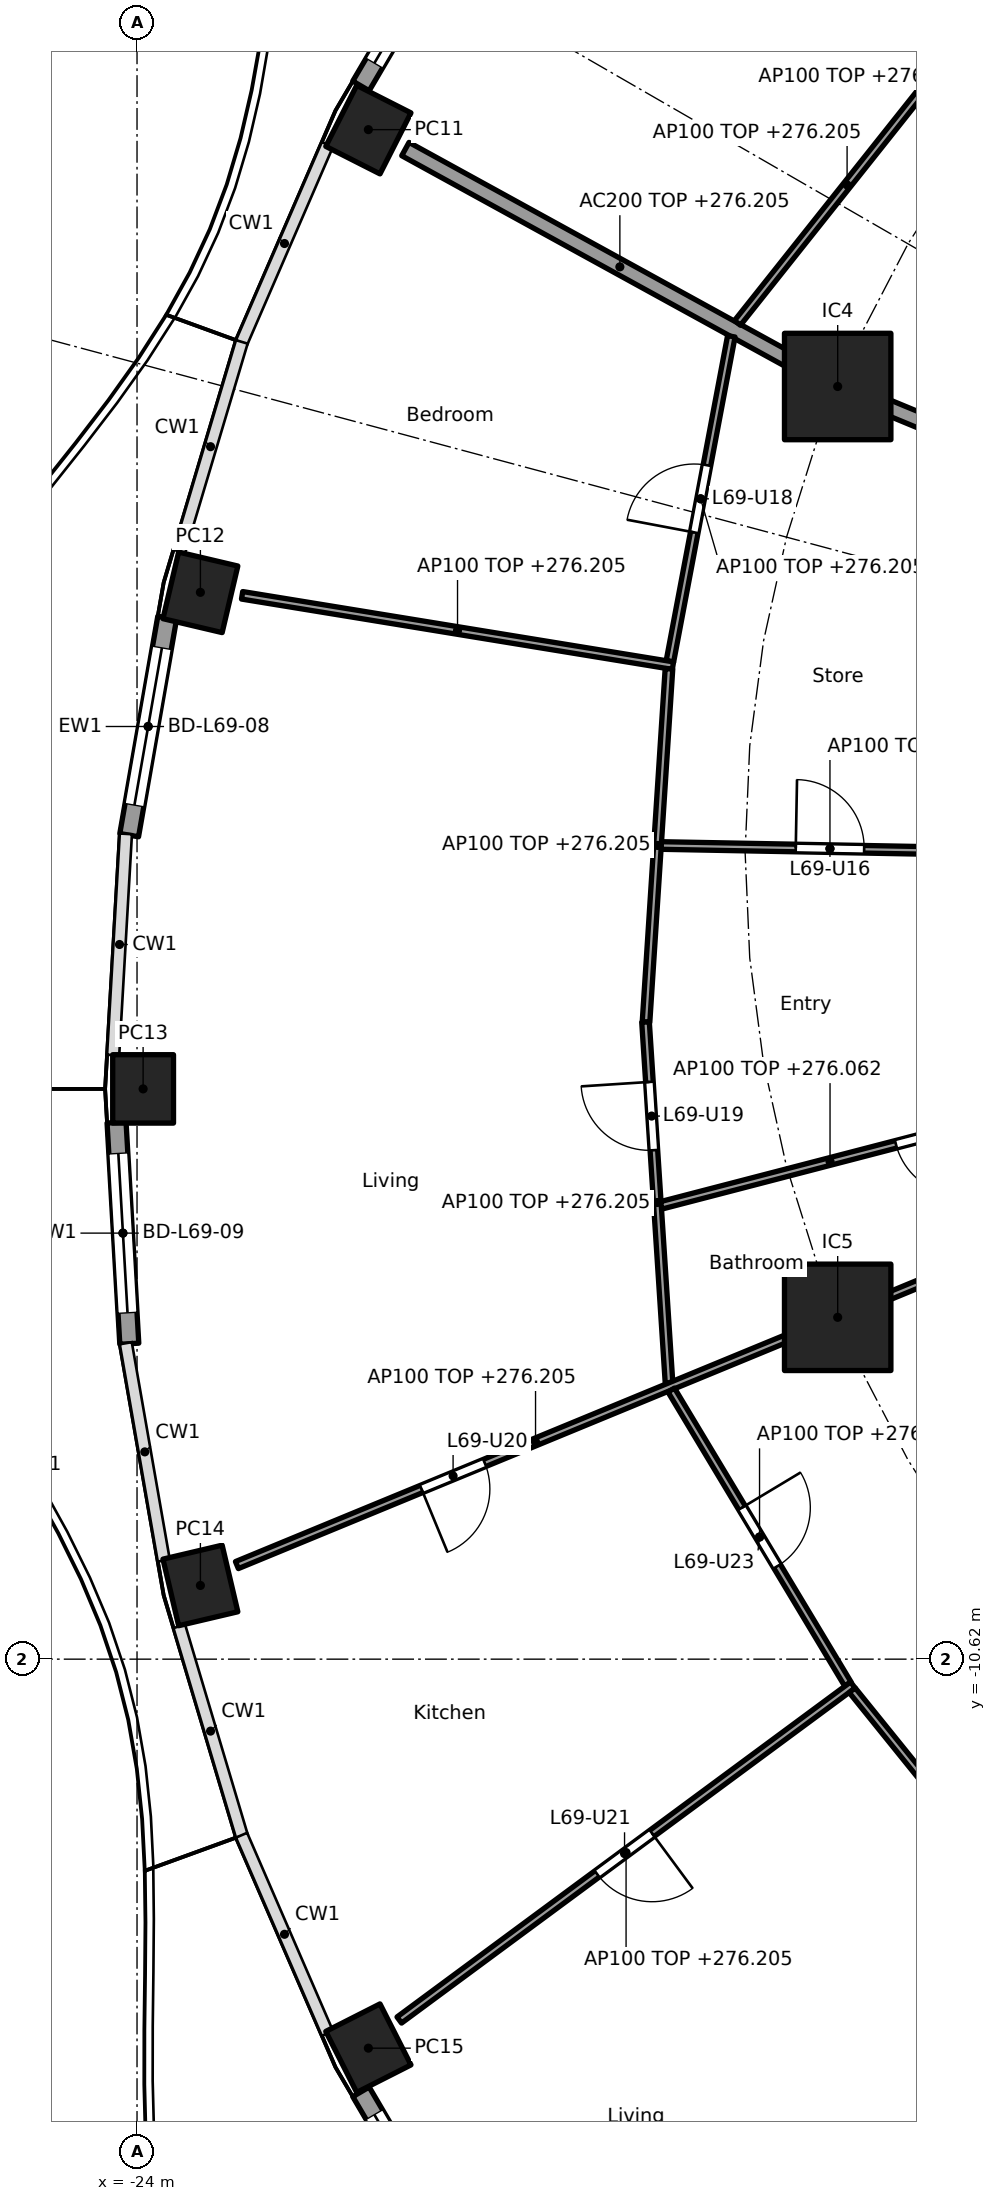
"""IFC4 building model, lengths in metres.
Left out: names, types, materials, properties, quantities, classifications, styles, units other than length and angle.
Written with IfcOpenShell. Run it as: python <this file> out.ifc"""

import sys

from ifc_helpers import new_model, si_unit, direction, frame, frame_2d, origin, origin_2d, place, context, subcontext, project, spatial, rectangle, hollow_rectangle, extrude, element, fill, save


model = new_model("IFC4")
c1 = context("Model", 3, precision=1e-05, world=origin(), true_north=direction((0.0, 1.0)))
c2 = subcontext(c1, "Body", "Model", "MODEL_VIEW")
j1 = project(units=[si_unit("LENGTHUNIT", "METRE"), si_unit("PLANEANGLEUNIT", "RADIAN")], contexts=[c1])
p1 = place(None, origin())
s1 = spatial("IfcSite", under=j1, at=p1, CompositionType="ELEMENT")
p2 = place(p1, origin())
s2 = spatial("IfcBuilding", under=s1, at=p2, CompositionType="ELEMENT")
p3 = place(p2, frame((0.0, 0.0, 273.3)))
s3 = spatial("IfcBuildingStorey", under=s2, at=p3, CompositionType="ELEMENT", Elevation=273.3)
for number, where, z_axis, x_axis in (
    (1, (-20.957, 9.502, 0.0), (0.0, 0.0, 1.0), (-0.452, -0.892, 0.0)),
    (2, (-23.166, 3.415, 0.0), (0.0, 0.0, 1.0), (-0.229, -0.973, 0.0)),
    (3, (-23.92, -3.118, 0.0), (0.0, 0.0, 1.0), (0.0, -1.0, 0.0)),
    (4, (-23.166, -9.65, 0.0), (0.0, 0.0, 1.0), (0.229, -0.973, 0.0)),
    (5, (-20.957, -15.738, 0.0), (0.0, 0.0, 1.0), (0.452, -0.892, 0.0)),
):
    element("IfcColumn", number, at=place(p3, frame(where, z_axis=z_axis, x_axis=x_axis)), inside=s3, PredefinedType="COLUMN", context=c2, shape_type="SweptSolid", body=[
        extrude(hollow_rectangle(XDim=0.9, YDim=0.8, WallThickness=0.028, at=origin_2d()), origin(), (0.0, 0.0, 1.0), 3.7),
    ])
for number, where, z_axis, x_axis in (
    (6, (-14.782, 6.123, 0.0), (0.0, 0.0, 1.0), (1.0, 0.0, 0.0)),
    (7, (-14.782, -6.123, 0.0), (0.0, 0.0, 1.0), (1.0, 0.0, 0.0)),
):
    element("IfcColumn", number, at=place(p3, frame(where, z_axis=z_axis, x_axis=x_axis)), inside=s3, PredefinedType="COLUMN", context=c2, shape_type="SweptSolid", body=[
        extrude(rectangle(XDim=1.4, YDim=1.4, at=origin_2d()), origin(), (0.0, 0.0, 1.0), 3.7),
    ])
p4 = place(p3, frame((-21.054, 10.077, 0.0), z_axis=(0.0, 0.0, 1.0), x_axis=(0.506371364425, 0.862315511452, 0.0)))
e8 = element("IfcWall", 8, at=p4, inside=s3, PredefinedType="SOLIDWALL", context=c2, shape_type="SweptSolid", body=[
    extrude(rectangle(XDim=2.796, YDim=0.25, at=frame_2d((1.398, 0.0))), origin(), (0.0, 0.0, 1.0), 3.44),
])
p5 = place(p4, frame((0.348, 0.0, 0.0)))
e9 = element("IfcOpeningElement", 9, at=p5, cuts=e8, PredefinedType="OPENING", context=c2, shape_type="SweptSolid", body=[
    extrude(rectangle(XDim=2.1, YDim=2.4, at=frame_2d((1.05, 1.2))), frame((0.0, 0.135, 0.0), z_axis=(0.0, -1.0, 0.0), x_axis=(1.0, 0.0, 0.0)), (0.0, 0.0, 1.0), 0.27),
])
p6 = place(p3, frame((-24.103, 0.22, 0.0), z_axis=(0.0, 0.0, 1.0), x_axis=(0.172182411767, 0.985065082661, 0.0)))
e10 = element("IfcWall", 10, at=p6, inside=s3, PredefinedType="SOLIDWALL", context=c2, shape_type="SweptSolid", body=[
    extrude(rectangle(XDim=2.903, YDim=0.25, at=frame_2d((1.451, 0.0))), origin(), (0.0, 0.0, 1.0), 3.44),
])
p7 = place(p6, frame((0.401, 0.0, 0.0)))
e11 = element("IfcOpeningElement", 11, at=p7, cuts=e10, PredefinedType="OPENING", context=c2, shape_type="SweptSolid", body=[
    extrude(rectangle(XDim=2.1, YDim=2.4, at=frame_2d((1.05, 1.2))), frame((0.0, 0.135, 0.0), z_axis=(0.0, -1.0, 0.0), x_axis=(1.0, 0.0, 0.0)), (0.0, 0.0, 1.0), 0.27),
])
p8 = place(p3, frame((-24.102, -6.47, 0.0), z_axis=(0.0, 0.0, 1.0), x_axis=(-0.057450463359, 0.99834835817, 0.0)))
e12 = element("IfcWall", 12, at=p8, inside=s3, PredefinedType="SOLIDWALL", context=c2, shape_type="SweptSolid", body=[
    extrude(rectangle(XDim=2.915, YDim=0.25, at=frame_2d((1.458, 0.0))), origin(), (0.0, 0.0, 1.0), 3.44),
])
p9 = place(p8, frame((0.408, 0.0, 0.0)))
e13 = element("IfcOpeningElement", 13, at=p9, cuts=e12, PredefinedType="OPENING", context=c2, shape_type="SweptSolid", body=[
    extrude(rectangle(XDim=2.1, YDim=2.4, at=frame_2d((1.05, 1.2))), frame((0.0, 0.135, 0.0), z_axis=(0.0, -1.0, 0.0), x_axis=(1.0, 0.0, 0.0)), (0.0, 0.0, 1.0), 0.27),
])
p10 = place(p3, frame((-19.638, -18.724, 0.0), z_axis=(0.0, 0.0, 1.0), x_axis=(-0.506371364425, 0.862315511452, 0.0)))
e14 = element("IfcWall", 14, at=p10, inside=s3, PredefinedType="SOLIDWALL", context=c2, shape_type="SweptSolid", body=[
    extrude(rectangle(XDim=2.796, YDim=0.25, at=frame_2d((1.398, 0.0))), origin(), (0.0, 0.0, 1.0), 3.44),
])
p11 = place(p10, frame((0.348, 0.0, 0.0)))
e15 = element("IfcOpeningElement", 15, at=p11, cuts=e14, PredefinedType="OPENING", context=c2, shape_type="SweptSolid", body=[
    extrude(rectangle(XDim=2.1, YDim=2.4, at=frame_2d((1.05, 1.2))), frame((0.0, 0.135, 0.0), z_axis=(0.0, -1.0, 0.0), x_axis=(1.0, 0.0, 0.0)), (0.0, 0.0, 1.0), 0.27),
])
p12 = place(p3, frame((-12.657, 5.243, 0.0), z_axis=(0.0, 0.0, 1.0), x_axis=(-0.923869415315, 0.382707856524, 0.0)))
e16 = element("IfcWall", 16, at=p12, inside=s3, PredefinedType="PARTITIONING", context=c2, shape_type="SweptSolid", body=[
    extrude(rectangle(XDim=2.2, YDim=0.2, at=frame_2d((1.1, 0.0))), origin(), (0.0, 0.0, 1.0), 3.44),
])
p13 = place(p3, frame((-14.826, 6.147, 0.0), z_axis=(0.0, 0.0, 1.0), x_axis=(-0.876484755865, 0.481429613481, 0.0)))
e17 = element("IfcWall", 17, at=p13, inside=s3, PredefinedType="PARTITIONING", context=c2, shape_type="SweptSolid", body=[
    extrude(rectangle(XDim=6.439, YDim=0.2, at=frame_2d((3.219, 0.0))), origin(), (0.0, 0.0, 1.0), 2.905),
])
p14 = place(p3, frame((-10.183, 7.727, 0.0), z_axis=(0.0, 0.0, 1.0), x_axis=(-0.719063433856, 0.694944442449, 0.0)))
e18 = element("IfcWall", 18, at=p14, inside=s3, PredefinedType="PARTITIONING", context=c2, shape_type="SweptSolid", body=[
    extrude(rectangle(XDim=9.535, YDim=0.1, at=frame_2d((4.768, 0.0))), origin(), (0.0, 0.0, 1.0), 2.762),
])
p15 = place(p14, frame((1.637, 0.0, 0.0)))
e19 = element("IfcOpeningElement", 19, at=p15, cuts=e18, PredefinedType="OPENING", context=c2, shape_type="SweptSolid", body=[
    extrude(rectangle(XDim=0.9, YDim=2.1, at=frame_2d((0.45, 1.05))), frame((0.0, 0.06, 0.0), z_axis=(0.0, -1.0, 0.0), x_axis=(1.0, 0.0, 0.0)), (0.0, 0.0, 1.0), 0.12),
])
p16 = place(p14, frame((6.405, 0.0, 0.0)))
e20 = element("IfcOpeningElement", 20, at=p16, cuts=e18, PredefinedType="OPENING", context=c2, shape_type="SweptSolid", body=[
    extrude(rectangle(XDim=0.9, YDim=2.1, at=frame_2d((0.45, 1.05))), frame((0.0, 0.06, 0.0), z_axis=(0.0, -1.0, 0.0), x_axis=(1.0, 0.0, 0.0)), (0.0, 0.0, 1.0), 0.12),
])
p17 = place(p3, frame((-13.216, 10.589, 0.0), z_axis=(0.0, 0.0, 1.0), x_axis=(-0.622251572882, -0.782817335045, 0.0)))
e21 = element("IfcWall", 21, at=p17, inside=s3, PredefinedType="PARTITIONING", context=c2, shape_type="SweptSolid", body=[
    extrude(rectangle(XDim=4.636, YDim=0.1, at=frame_2d((2.318, 0.0))), origin(), (0.0, 0.0, 1.0), 2.905),
])
p18 = place(p3, frame((-16.181, 6.783, 0.0), z_axis=(0.0, 0.0, 1.0), x_axis=(-0.185670583745, -0.982612046706, 0.0)))
e22 = element("IfcWall", 22, at=p18, inside=s3, PredefinedType="PARTITIONING", context=c2, shape_type="SweptSolid", body=[
    extrude(rectangle(XDim=4.351, YDim=0.1, at=frame_2d((2.176, 0.0))), origin(), (0.0, 0.0, 1.0), 2.905),
])
p19 = place(p18, frame((1.726, 0.0, 0.0)))
e23 = element("IfcOpeningElement", 23, at=p19, cuts=e22, PredefinedType="OPENING", context=c2, shape_type="SweptSolid", body=[
    extrude(rectangle(XDim=0.9, YDim=2.1, at=frame_2d((0.45, 1.05))), frame((0.0, 0.06, 0.0), z_axis=(0.0, -1.0, 0.0), x_axis=(1.0, 0.0, 0.0)), (0.0, 0.0, 1.0), 0.12),
])
p20 = place(p3, frame((-16.949, 2.451, 0.0), z_axis=(0.0, 0.0, 1.0), x_axis=(-0.986937570833, 0.161103169673, 0.0)))
e24 = element("IfcWall", 24, at=p20, inside=s3, PredefinedType="PARTITIONING", context=c2, shape_type="SweptSolid", body=[
    extrude(rectangle(XDim=5.743, YDim=0.1, at=frame_2d((2.872, 0.0))), origin(), (0.0, 0.0, 1.0), 2.905),
])
p21 = place(p3, frame((-17.002, 2.409, 0.0), z_axis=(0.0, 0.0, 1.0), x_axis=(-0.064855550758, -0.997894662545, 0.0)))
e25 = element("IfcWall", 25, at=p21, inside=s3, PredefinedType="PARTITIONING", context=c2, shape_type="SweptSolid", body=[
    extrude(rectangle(XDim=4.656, YDim=0.1, at=frame_2d((2.328, 0.0))), origin(), (0.0, 0.0, 1.0), 2.905),
])
p22 = place(p3, frame((-12.665, 0.002, 0.0), z_axis=(0.0, 0.0, 1.0), x_axis=(-0.999827178165, 0.018590691287, 0.0)))
e26 = element("IfcWall", 26, at=p22, inside=s3, PredefinedType="PARTITIONING", context=c2, shape_type="SweptSolid", body=[
    extrude(rectangle(XDim=4.439, YDim=0.1, at=frame_2d((2.219, 0.0))), origin(), (0.0, 0.0, 1.0), 2.762),
])
p23 = place(p22, frame((1.769, 0.0, 0.0)))
e27 = element("IfcOpeningElement", 27, at=p23, cuts=e26, PredefinedType="OPENING", context=c2, shape_type="SweptSolid", body=[
    extrude(rectangle(XDim=0.9, YDim=2.1, at=frame_2d((0.45, 1.05))), frame((0.0, 0.06, 0.0), z_axis=(0.0, -1.0, 0.0), x_axis=(1.0, 0.0, 0.0)), (0.0, 0.0, 1.0), 0.12),
])
p24 = place(p3, frame((-17.31, -2.238, 0.0), z_axis=(0.0, 0.0, 1.0), x_axis=(0.064949202176, -0.997888571503, 0.0)))
e28 = element("IfcWall", 28, at=p24, inside=s3, PredefinedType="PARTITIONING", context=c2, shape_type="SweptSolid", body=[
    extrude(rectangle(XDim=4.759, YDim=0.1, at=frame_2d((2.379, 0.0))), origin(), (0.0, 0.0, 1.0), 2.905),
])
p25 = place(p24, frame((0.79, 0.0, 0.0)))
e29 = element("IfcOpeningElement", 29, at=p25, cuts=e28, PredefinedType="OPENING", context=c2, shape_type="SweptSolid", body=[
    extrude(rectangle(XDim=0.9, YDim=2.1, at=frame_2d((0.45, 1.05))), frame((0.0, 0.06, 0.0), z_axis=(0.0, -1.0, 0.0), x_axis=(1.0, 0.0, 0.0)), (0.0, 0.0, 1.0), 0.12),
])
p26 = place(p3, frame((-12.662, -3.495, 0.0), z_axis=(0.0, 0.0, 1.0), x_axis=(-0.967834941053, -0.251586022817, 0.0)))
e30 = element("IfcWall", 30, at=p26, inside=s3, PredefinedType="PARTITIONING", context=c2, shape_type="SweptSolid", body=[
    extrude(rectangle(XDim=4.59, YDim=0.1, at=frame_2d((2.295, 0.0))), origin(), (0.0, 0.0, 1.0), 2.762),
])
p27 = place(p26, frame((0.5, 0.0, 0.0)))
e31 = element("IfcOpeningElement", 31, at=p27, cuts=e30, PredefinedType="OPENING", context=c2, shape_type="SweptSolid", body=[
    extrude(rectangle(XDim=0.9, YDim=2.1, at=frame_2d((0.45, 1.05))), frame((0.0, 0.06, 0.0), z_axis=(0.0, -1.0, 0.0), x_axis=(1.0, 0.0, 0.0)), (0.0, 0.0, 1.0), 0.12),
])
p28 = place(p3, frame((-12.657, -5.243, 0.0), z_axis=(0.0, 0.0, 1.0), x_axis=(-0.923871314276, -0.382703272338, 0.0)))
e32 = element("IfcWall", 32, at=p28, inside=s3, PredefinedType="PARTITIONING", context=c2, shape_type="SweptSolid", body=[
    extrude(rectangle(XDim=2.249, YDim=0.1, at=frame_2d((1.125, 0.0))), origin(), (0.0, 0.0, 1.0), 3.44),
])
p29 = place(p3, frame((-14.828, -6.142, 0.0), z_axis=(0.0, 0.0, 1.0), x_axis=(-0.924478087429, -0.381235184451, 0.0)))
e33 = element("IfcWall", 33, at=p29, inside=s3, PredefinedType="PARTITIONING", context=c2, shape_type="SweptSolid", body=[
    extrude(rectangle(XDim=8.499, YDim=0.1, at=frame_2d((4.25, 0.0))), origin(), (0.0, 0.0, 1.0), 2.905),
])
p30 = place(p29, frame((4.973, 0.0, 0.0)))
e34 = element("IfcOpeningElement", 34, at=p30, cuts=e33, PredefinedType="OPENING", context=c2, shape_type="SweptSolid", body=[
    extrude(rectangle(XDim=0.9, YDim=2.1, at=frame_2d((0.45, 1.05))), frame((0.0, 0.06, 0.0), z_axis=(0.0, -1.0, 0.0), x_axis=(1.0, 0.0, 0.0)), (0.0, 0.0, 1.0), 0.12),
])
p31 = place(p3, frame((-16.972, -7.08, 0.0), z_axis=(0.0, 0.0, 1.0), x_axis=(0.514989049311, -0.857196756346, 0.0)))
e35 = element("IfcWall", 35, at=p31, inside=s3, PredefinedType="PARTITIONING", context=c2, shape_type="SweptSolid", body=[
    extrude(rectangle(XDim=4.512, YDim=0.1, at=frame_2d((2.256, 0.0))), origin(), (0.0, 0.0, 1.0), 2.905),
])
p32 = place(p31, frame((1.806, 0.0, 0.0)))
e36 = element("IfcOpeningElement", 36, at=p32, cuts=e35, PredefinedType="OPENING", context=c2, shape_type="SweptSolid", body=[
    extrude(rectangle(XDim=0.9, YDim=2.1, at=frame_2d((0.45, 1.05))), frame((0.0, 0.06, 0.0), z_axis=(0.0, -1.0, 0.0), x_axis=(1.0, 0.0, 0.0)), (0.0, 0.0, 1.0), 0.12),
])
p33 = place(p3, frame((-14.582, -10.96, 0.0), z_axis=(0.0, 0.0, 1.0), x_axis=(-0.804405200554, -0.594081032623, 0.0)))
e37 = element("IfcWall", 37, at=p33, inside=s3, PredefinedType="PARTITIONING", context=c2, shape_type="SweptSolid", body=[
    extrude(rectangle(XDim=7.418, YDim=0.1, at=frame_2d((3.709, 0.0))), origin(), (0.0, 0.0, 1.0), 2.905),
])
p34 = place(p33, frame((3.284, 0.0, 0.0)))
e38 = element("IfcOpeningElement", 38, at=p34, cuts=e37, PredefinedType="OPENING", context=c2, shape_type="SweptSolid", body=[
    extrude(rectangle(XDim=0.9, YDim=2.1, at=frame_2d((0.45, 1.05))), frame((0.0, 0.06, 0.0), z_axis=(0.0, -1.0, 0.0), x_axis=(1.0, 0.0, 0.0)), (0.0, 0.0, 1.0), 0.12),
])
p35 = place(p3, frame((-14.591, -11.029, 0.0), z_axis=(0.0, 0.0, 1.0), x_axis=(0.628170338674, -0.778075848237, 0.0)))
e39 = element("IfcWall", 39, at=p35, inside=s3, PredefinedType="PARTITIONING", context=c2, shape_type="SweptSolid", body=[
    extrude(rectangle(XDim=4.532, YDim=0.1, at=frame_2d((2.266, 0.0))), origin(), (0.0, 0.0, 1.0), 2.905),
])
p36 = place(p35, frame((2.949, 0.0, 0.0)))
e40 = element("IfcOpeningElement", 40, at=p36, cuts=e39, PredefinedType="OPENING", context=c2, shape_type="SweptSolid", body=[
    extrude(rectangle(XDim=0.9, YDim=2.1, at=frame_2d((0.45, 1.05))), frame((0.0, 0.06, 0.0), z_axis=(0.0, -1.0, 0.0), x_axis=(1.0, 0.0, 0.0)), (0.0, 0.0, 1.0), 0.12),
])
p37 = place(p3, frame((-11.679, -14.557, 0.0), z_axis=(0.0, 0.0, 1.0), x_axis=(-0.670800011545, -0.741638284146, 0.0)))
e41 = element("IfcWall", 41, at=p37, inside=s3, PredefinedType="PARTITIONING", context=c2, shape_type="SweptSolid", body=[
    extrude(rectangle(XDim=8.068, YDim=0.1, at=frame_2d((4.034, 0.0))), origin(), (0.0, 0.0, 1.0), 2.905),
])
p38 = place(p37, frame((3.609, 0.0, 0.0)))
e42 = element("IfcOpeningElement", 42, at=p38, cuts=e41, PredefinedType="OPENING", context=c2, shape_type="SweptSolid", body=[
    extrude(rectangle(XDim=0.9, YDim=2.1, at=frame_2d((0.45, 1.05))), frame((0.0, 0.06, 0.0), z_axis=(0.0, -1.0, 0.0), x_axis=(1.0, 0.0, 0.0)), (0.0, 0.0, 1.0), 0.12),
])
p39 = place(p5, origin())
e43 = element("IfcDoor", 43, at=p39, inside=s3, OperationType="SLIDING_TO_LEFT", PredefinedType="DOOR", context=c2, shape_type="SweptSolid", body=[
    extrude(rectangle(XDim=2.1, YDim=2.4, at=frame_2d((1.05, 1.2))), frame((0.0, 0.025, 0.0), z_axis=(0.0, -1.0, 0.0), x_axis=(1.0, 0.0, 0.0)), (0.0, 0.0, 1.0), 0.05),
])
fill(e9, e43)
p40 = place(p7, origin())
e44 = element("IfcDoor", 44, at=p40, inside=s3, OperationType="SLIDING_TO_LEFT", PredefinedType="DOOR", context=c2, shape_type="SweptSolid", body=[
    extrude(rectangle(XDim=2.1, YDim=2.4, at=frame_2d((1.05, 1.2))), frame((0.0, 0.025, 0.0), z_axis=(0.0, -1.0, 0.0), x_axis=(1.0, 0.0, 0.0)), (0.0, 0.0, 1.0), 0.05),
])
fill(e11, e44)
p41 = place(p9, origin())
e45 = element("IfcDoor", 45, at=p41, inside=s3, OperationType="SLIDING_TO_LEFT", PredefinedType="DOOR", context=c2, shape_type="SweptSolid", body=[
    extrude(rectangle(XDim=2.1, YDim=2.4, at=frame_2d((1.05, 1.2))), frame((0.0, 0.025, 0.0), z_axis=(0.0, -1.0, 0.0), x_axis=(1.0, 0.0, 0.0)), (0.0, 0.0, 1.0), 0.05),
])
fill(e13, e45)
p42 = place(p11, origin())
e46 = element("IfcDoor", 46, at=p42, inside=s3, OperationType="SLIDING_TO_LEFT", PredefinedType="DOOR", context=c2, shape_type="SweptSolid", body=[
    extrude(rectangle(XDim=2.1, YDim=2.4, at=frame_2d((1.05, 1.2))), frame((0.0, 0.025, 0.0), z_axis=(0.0, -1.0, 0.0), x_axis=(1.0, 0.0, 0.0)), (0.0, 0.0, 1.0), 0.05),
])
fill(e15, e46)
p43 = place(p23, frame((0.9, 0.0, 0.0), x_axis=(-1.0, 0.0, 0.0)))
e47 = element("IfcDoor", 47, at=p43, inside=s3, OperationType="SINGLE_SWING_LEFT", PredefinedType="DOOR", context=c2, shape_type="SweptSolid", body=[
    extrude(rectangle(XDim=0.9, YDim=2.1, at=frame_2d((0.45, 1.05))), frame((0.0, 0.025, 0.0), z_axis=(0.0, -1.0, 0.0), x_axis=(1.0, 0.0, 0.0)), (0.0, 0.0, 1.0), 0.05),
])
fill(e27, e47)
p44 = place(p27, origin())
e48 = element("IfcDoor", 48, at=p44, inside=s3, OperationType="SINGLE_SWING_LEFT", PredefinedType="DOOR", context=c2, shape_type="SweptSolid", body=[
    extrude(rectangle(XDim=0.9, YDim=2.1, at=frame_2d((0.45, 1.05))), frame((0.0, 0.025, 0.0), z_axis=(0.0, -1.0, 0.0), x_axis=(1.0, 0.0, 0.0)), (0.0, 0.0, 1.0), 0.05),
])
fill(e31, e48)
p45 = place(p19, frame((0.9, 0.0, 0.0), x_axis=(-1.0, 0.0, 0.0)))
e49 = element("IfcDoor", 49, at=p45, inside=s3, OperationType="SINGLE_SWING_LEFT", PredefinedType="DOOR", context=c2, shape_type="SweptSolid", body=[
    extrude(rectangle(XDim=0.9, YDim=2.1, at=frame_2d((0.45, 1.05))), frame((0.0, 0.025, 0.0), z_axis=(0.0, -1.0, 0.0), x_axis=(1.0, 0.0, 0.0)), (0.0, 0.0, 1.0), 0.05),
])
fill(e23, e49)
p46 = place(p25, frame((0.9, 0.0, 0.0), x_axis=(-1.0, 0.0, 0.0)))
e50 = element("IfcDoor", 50, at=p46, inside=s3, OperationType="SINGLE_SWING_RIGHT", PredefinedType="DOOR", context=c2, shape_type="SweptSolid", body=[
    extrude(rectangle(XDim=0.9, YDim=2.1, at=frame_2d((0.45, 1.05))), frame((0.0, 0.025, 0.0), z_axis=(0.0, -1.0, 0.0), x_axis=(1.0, 0.0, 0.0)), (0.0, 0.0, 1.0), 0.05),
])
fill(e29, e50)
p47 = place(p30, origin())
e51 = element("IfcDoor", 51, at=p47, inside=s3, OperationType="SINGLE_SWING_RIGHT", PredefinedType="DOOR", context=c2, shape_type="SweptSolid", body=[
    extrude(rectangle(XDim=0.9, YDim=2.1, at=frame_2d((0.45, 1.05))), frame((0.0, 0.025, 0.0), z_axis=(0.0, -1.0, 0.0), x_axis=(1.0, 0.0, 0.0)), (0.0, 0.0, 1.0), 0.05),
])
fill(e34, e51)
p48 = place(p34, origin())
e52 = element("IfcDoor", 52, at=p48, inside=s3, OperationType="SINGLE_SWING_LEFT", PredefinedType="DOOR", context=c2, shape_type="SweptSolid", body=[
    extrude(rectangle(XDim=0.9, YDim=2.1, at=frame_2d((0.45, 1.05))), frame((0.0, 0.025, 0.0), z_axis=(0.0, -1.0, 0.0), x_axis=(1.0, 0.0, 0.0)), (0.0, 0.0, 1.0), 0.05),
])
fill(e38, e52)
p49 = place(p32, origin())
e53 = element("IfcDoor", 53, at=p49, inside=s3, OperationType="SINGLE_SWING_LEFT", PredefinedType="DOOR", context=c2, shape_type="SweptSolid", body=[
    extrude(rectangle(XDim=0.9, YDim=2.1, at=frame_2d((0.45, 1.05))), frame((0.0, 0.025, 0.0), z_axis=(0.0, -1.0, 0.0), x_axis=(1.0, 0.0, 0.0)), (0.0, 0.0, 1.0), 0.05),
])
fill(e36, e53)
save(model, sys.argv[1])
